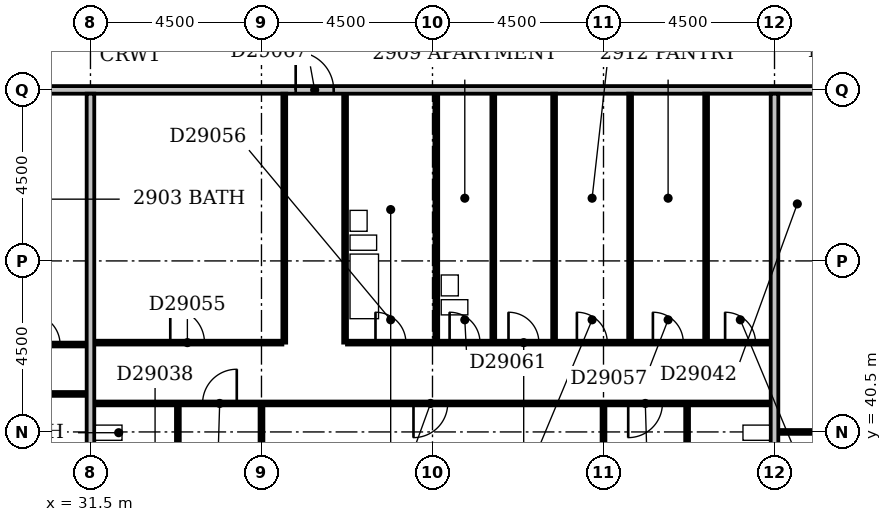
"""IFC4 building model, lengths in metres.
Left out: names, types, materials, properties, quantities, classifications, styles, units other than length and angle.
Written with IfcOpenShell. Run it as: python <this file> out.ifc"""

import sys

from ifc_helpers import new_model, si_unit, direction, frame, frame_2d, origin, place, context, subcontext, project, spatial, rectangle, extrude, element, fill, save


model = new_model("IFC4")
c1 = context("Model", 3, precision=1e-05, world=origin(), true_north=direction((0.0, 1.0)))
c2 = subcontext(c1, "Body", "Model", "MODEL_VIEW")
j1 = project(units=[si_unit("LENGTHUNIT", "METRE"), si_unit("PLANEANGLEUNIT", "RADIAN")], contexts=[c1])
p1 = place(None, origin())
s1 = spatial("IfcSite", under=j1, at=p1, CompositionType="ELEMENT")
p2 = place(p1, origin())
s2 = spatial("IfcBuilding", under=s1, at=p2, CompositionType="ELEMENT")
p3 = place(p2, frame((0.0, 0.0, 119.6)))
s3 = spatial("IfcBuildingStorey", under=s2, at=p3, CompositionType="ELEMENT", Elevation=119.6)
p4 = place(p3, frame((31.5, 36.5, 0.0), z_axis=(0.0, 0.0, 1.0), x_axis=(0.0, 1.0, 0.0)))
e1 = element("IfcWall", 1, at=p4, inside=s3, PredefinedType="PARTITIONING", context=c2, shape_type="SweptSolid", body=[
    extrude(rectangle(XDim=12.9, YDim=0.2, at=frame_2d((6.45, 0.0))), origin(), (0.0, 0.0, 1.0), 3.3),
])
p5 = place(p3, frame((36.0, 36.5, 0.0), z_axis=(0.0, 0.0, 1.0), x_axis=(0.0, 1.0, 0.0)))
e2 = element("IfcWall", 2, at=p5, inside=s3, PredefinedType="PARTITIONING", context=c2, shape_type="SweptSolid", body=[
    extrude(rectangle(XDim=4.7, YDim=0.1, at=frame_2d((2.35, 0.0))), origin(), (0.0, 0.0, 1.0), 2.4),
])
p6 = place(p3, frame((45.0, 36.5, 0.0), z_axis=(0.0, 0.0, 1.0), x_axis=(0.0, 1.0, 0.0)))
e3 = element("IfcWall", 3, at=p6, inside=s3, PredefinedType="PARTITIONING", context=c2, shape_type="SweptSolid", body=[
    extrude(rectangle(XDim=4.7, YDim=0.1, at=frame_2d((2.35, 0.0))), origin(), (0.0, 0.0, 1.0), 2.6),
])
p7 = place(p3, frame((49.5, 36.5, 0.0), z_axis=(0.0, 0.0, 1.0), x_axis=(0.0, 1.0, 0.0)))
e4 = element("IfcWall", 4, at=p7, inside=s3, PredefinedType="PARTITIONING", context=c2, shape_type="SweptSolid", body=[
    extrude(rectangle(XDim=12.9, YDim=0.2, at=frame_2d((6.45, 0.0))), origin(), (0.0, 0.0, 1.0), 3.3),
])
p8 = place(p3, frame((33.8, 38.35, 0.0), z_axis=(0.0, 0.0, 1.0), x_axis=(0.0, 1.0, 0.0)))
e5 = element("IfcWall", 5, at=p8, inside=s3, PredefinedType="PLUMBINGWALL", context=c2, shape_type="SweptSolid", body=[
    extrude(rectangle(XDim=2.85, YDim=0.1, at=frame_2d((1.425, 0.0))), origin(), (0.0, 0.0, 1.0), 3.3),
])
p9 = place(p8, frame((1.05, 0.0, 0.0)))
e6 = element("IfcOpeningElement", 6, at=p9, cuts=e5, PredefinedType="OPENING", context=c2, shape_type="SweptSolid", body=[
    extrude(rectangle(XDim=0.8, YDim=2.1, at=frame_2d((0.4, 1.05))), frame((0.0, 0.062, 0.0), z_axis=(0.0, -1.0, 0.0), x_axis=(1.0, 0.0, 0.0)), (0.0, 0.0, 1.0), 0.124),
])
p10 = place(p3, frame((47.2, 38.35, 0.0), z_axis=(0.0, 0.0, 1.0), x_axis=(0.0, 1.0, 0.0)))
e7 = element("IfcWall", 7, at=p10, inside=s3, PredefinedType="PLUMBINGWALL", context=c2, shape_type="SweptSolid", body=[
    extrude(rectangle(XDim=2.85, YDim=0.1, at=frame_2d((1.425, 0.0))), origin(), (0.0, 0.0, 1.0), 3.3),
])
p11 = place(p10, frame((1.05, 0.0, 0.0)))
e8 = element("IfcOpeningElement", 8, at=p11, cuts=e7, PredefinedType="OPENING", context=c2, shape_type="SweptSolid", body=[
    extrude(rectangle(XDim=0.8, YDim=2.1, at=frame_2d((0.4, 1.05))), frame((0.0, 0.062, 0.0), z_axis=(0.0, -1.0, 0.0), x_axis=(1.0, 0.0, 0.0)), (0.0, 0.0, 1.0), 0.124),
])
p12 = place(p3, frame((49.6, 40.5, 0.0), z_axis=(0.0, 0.0, 1.0), x_axis=(1.0, 0.0, 0.0)))
e9 = element("IfcWall", 9, at=p12, inside=s3, PredefinedType="PARTITIONING", context=c2, shape_type="SweptSolid", body=[
    extrude(rectangle(XDim=4.3, YDim=0.1, at=frame_2d((2.15, 0.0))), origin(), (0.0, 0.0, 1.0), 3.3),
])
p13 = place(p12, frame((1.7, 0.0, 0.0)))
e10 = element("IfcOpeningElement", 10, at=p13, cuts=e9, PredefinedType="OPENING", context=c2, shape_type="SweptSolid", body=[
    extrude(rectangle(XDim=0.9, YDim=2.1, at=frame_2d((0.45, 1.05))), frame((0.0, 0.062, 0.0), z_axis=(0.0, -1.0, 0.0), x_axis=(1.0, 0.0, 0.0)), (0.0, 0.0, 1.0), 0.124),
])
p14 = place(p3, frame((31.6, 41.25, 0.0), z_axis=(0.0, 0.0, 1.0), x_axis=(1.0, 0.0, 0.0)))
e11 = element("IfcWall", 11, at=p14, inside=s3, PredefinedType="PARTITIONING", context=c2, shape_type="SweptSolid", body=[
    extrude(rectangle(XDim=17.8, YDim=0.1, at=frame_2d((8.9, 0.0))), origin(), (0.0, 0.0, 1.0), 3.3),
])
p15 = place(p14, frame((2.85, 0.0, 0.0)))
e12 = element("IfcOpeningElement", 12, at=p15, cuts=e11, PredefinedType="OPENING", context=c2, shape_type="SweptSolid", body=[
    extrude(rectangle(XDim=0.9, YDim=2.1, at=frame_2d((0.45, 1.05))), frame((0.0, 0.062, 0.0), z_axis=(0.0, -1.0, 0.0), x_axis=(1.0, 0.0, 0.0)), (0.0, 0.0, 1.0), 0.124),
])
p16 = place(p14, frame((8.4, 0.0, 0.0)))
e13 = element("IfcOpeningElement", 13, at=p16, cuts=e11, PredefinedType="OPENING", context=c2, shape_type="SweptSolid", body=[
    extrude(rectangle(XDim=0.9, YDim=2.1, at=frame_2d((0.45, 1.05))), frame((0.0, 0.062, 0.0), z_axis=(0.0, -1.0, 0.0), x_axis=(1.0, 0.0, 0.0)), (0.0, 0.0, 1.0), 0.124),
])
p17 = place(p14, frame((14.05, 0.0, 0.0)))
e14 = element("IfcOpeningElement", 14, at=p17, cuts=e11, PredefinedType="OPENING", context=c2, shape_type="SweptSolid", body=[
    extrude(rectangle(XDim=0.9, YDim=2.1, at=frame_2d((0.45, 1.05))), frame((0.0, 0.062, 0.0), z_axis=(0.0, -1.0, 0.0), x_axis=(1.0, 0.0, 0.0)), (0.0, 0.0, 1.0), 0.124),
])
p18 = place(p3, frame((22.6, 41.5, 0.0), z_axis=(0.0, 0.0, 1.0), x_axis=(1.0, 0.0, 0.0)))
e15 = element("IfcWall", 15, at=p18, inside=s3, PredefinedType="PARTITIONING", context=c2, shape_type="SweptSolid", body=[
    extrude(rectangle(XDim=8.8, YDim=0.1, at=frame_2d((4.4, 0.0))), origin(), (0.0, 0.0, 1.0), 3.3),
])
p19 = place(p18, frame((1.7, 0.0, 0.0)))
e16 = element("IfcOpeningElement", 16, at=p19, cuts=e15, PredefinedType="OPENING", context=c2, shape_type="SweptSolid", body=[
    extrude(rectangle(XDim=0.9, YDim=2.1, at=frame_2d((0.45, 1.05))), frame((0.0, 0.062, 0.0), z_axis=(0.0, -1.0, 0.0), x_axis=(1.0, 0.0, 0.0)), (0.0, 0.0, 1.0), 0.124),
])
p20 = place(p18, frame((6.2, 0.0, 0.0)))
e17 = element("IfcOpeningElement", 17, at=p20, cuts=e15, PredefinedType="OPENING", context=c2, shape_type="SweptSolid", body=[
    extrude(rectangle(XDim=0.9, YDim=2.1, at=frame_2d((0.45, 1.05))), frame((0.0, 0.062, 0.0), z_axis=(0.0, -1.0, 0.0), x_axis=(1.0, 0.0, 0.0)), (0.0, 0.0, 1.0), 0.124),
])
p21 = place(p3, frame((24.15, 42.8, 0.0), z_axis=(0.0, 0.0, 1.0), x_axis=(1.0, 0.0, 0.0)))
e18 = element("IfcWall", 18, at=p21, inside=s3, PredefinedType="PARTITIONING", context=c2, shape_type="SweptSolid", body=[
    extrude(rectangle(XDim=7.25, YDim=0.1, at=frame_2d((3.625, 0.0))), origin(), (0.0, 0.0, 1.0), 3.3),
])
p22 = place(p21, frame((5.75, 0.0, 0.0)))
e19 = element("IfcOpeningElement", 19, at=p22, cuts=e18, PredefinedType="OPENING", context=c2, shape_type="SweptSolid", body=[
    extrude(rectangle(XDim=0.8, YDim=2.1, at=frame_2d((0.4, 1.05))), frame((0.0, 0.062, 0.0), z_axis=(0.0, -1.0, 0.0), x_axis=(1.0, 0.0, 0.0)), (0.0, 0.0, 1.0), 0.124),
])
p23 = place(p21, frame((2.0, 0.0, 0.0)))
e20 = element("IfcOpeningElement", 20, at=p23, cuts=e18, PredefinedType="OPENING", context=c2, shape_type="SweptSolid", body=[
    extrude(rectangle(XDim=0.9, YDim=2.1, at=frame_2d((0.45, 1.05))), frame((0.0, 0.062, 0.0), z_axis=(0.0, -1.0, 0.0), x_axis=(1.0, 0.0, 0.0)), (0.0, 0.0, 1.0), 0.124),
])
p24 = place(p3, frame((31.6, 42.85, 0.0), z_axis=(0.0, 0.0, 1.0), x_axis=(1.0, 0.0, 0.0)))
e21 = element("IfcWall", 21, at=p24, inside=s3, PredefinedType="PARTITIONING", context=c2, shape_type="SweptSolid", body=[
    extrude(rectangle(XDim=4.95, YDim=0.1, at=frame_2d((2.475, 0.0))), origin(), (0.0, 0.0, 1.0), 3.3),
])
p25 = place(p24, frame((2.0, 0.0, 0.0)))
e22 = element("IfcOpeningElement", 22, at=p25, cuts=e21, PredefinedType="OPENING", context=c2, shape_type="SweptSolid", body=[
    extrude(rectangle(XDim=0.9, YDim=2.1, at=frame_2d((0.45, 1.05))), frame((0.0, 0.062, 0.0), z_axis=(0.0, -1.0, 0.0), x_axis=(1.0, 0.0, 0.0)), (0.0, 0.0, 1.0), 0.124),
])
p26 = place(p3, frame((36.6, 42.85, 0.0), z_axis=(0.0, 0.0, 1.0), x_axis=(0.0, 1.0, 0.0)))
e23 = element("IfcWall", 23, at=p26, inside=s3, PredefinedType="PARTITIONING", context=c2, shape_type="SweptSolid", body=[
    extrude(rectangle(XDim=6.55, YDim=0.1, at=frame_2d((3.275, 0.0))), origin(), (0.0, 0.0, 1.0), 2.4),
])
p27 = place(p3, frame((38.2, 42.85, 0.0), z_axis=(0.0, 0.0, 1.0), x_axis=(0.0, 1.0, 0.0)))
e24 = element("IfcWall", 24, at=p27, inside=s3, PredefinedType="PLUMBINGWALL", context=c2, shape_type="SweptSolid", body=[
    extrude(rectangle(XDim=6.55, YDim=0.1, at=frame_2d((3.275, 0.0))), origin(), (0.0, 0.0, 1.0), 3.3),
])
p28 = place(p3, frame((38.25, 42.85, 0.0), z_axis=(0.0, 0.0, 1.0), x_axis=(1.0, 0.0, 0.0)))
e25 = element("IfcWall", 25, at=p28, inside=s3, PredefinedType="PARTITIONING", context=c2, shape_type="SweptSolid", body=[
    extrude(rectangle(XDim=11.15, YDim=0.1, at=frame_2d((5.575, 0.0))), origin(), (0.0, 0.0, 1.0), 3.3),
])
p29 = place(p28, frame((0.75, 0.0, 0.0)))
e26 = element("IfcOpeningElement", 26, at=p29, cuts=e25, PredefinedType="OPENING", context=c2, shape_type="SweptSolid", body=[
    extrude(rectangle(XDim=0.8, YDim=2.1, at=frame_2d((0.4, 1.05))), frame((0.0, 0.062, 0.0), z_axis=(0.0, -1.0, 0.0), x_axis=(1.0, 0.0, 0.0)), (0.0, 0.0, 1.0), 0.124),
])
p30 = place(p28, frame((8.05, 0.0, 0.0)))
e27 = element("IfcOpeningElement", 27, at=p30, cuts=e25, PredefinedType="OPENING", context=c2, shape_type="SweptSolid", body=[
    extrude(rectangle(XDim=0.8, YDim=2.1, at=frame_2d((0.4, 1.05))), frame((0.0, 0.062, 0.0), z_axis=(0.0, -1.0, 0.0), x_axis=(1.0, 0.0, 0.0)), (0.0, 0.0, 1.0), 0.124),
])
p31 = place(p28, frame((4.25, 0.0, 0.0)))
e28 = element("IfcOpeningElement", 28, at=p31, cuts=e25, PredefinedType="OPENING", context=c2, shape_type="SweptSolid", body=[
    extrude(rectangle(XDim=0.8, YDim=2.1, at=frame_2d((0.4, 1.05))), frame((0.0, 0.062, 0.0), z_axis=(0.0, -1.0, 0.0), x_axis=(1.0, 0.0, 0.0)), (0.0, 0.0, 1.0), 0.124),
])
p32 = place(p28, frame((6.05, 0.0, 0.0)))
e29 = element("IfcOpeningElement", 29, at=p32, cuts=e25, PredefinedType="OPENING", context=c2, shape_type="SweptSolid", body=[
    extrude(rectangle(XDim=0.8, YDim=2.1, at=frame_2d((0.4, 1.05))), frame((0.0, 0.062, 0.0), z_axis=(0.0, -1.0, 0.0), x_axis=(1.0, 0.0, 0.0)), (0.0, 0.0, 1.0), 0.124),
])
p33 = place(p28, frame((9.95, 0.0, 0.0)))
e30 = element("IfcOpeningElement", 30, at=p33, cuts=e25, PredefinedType="OPENING", context=c2, shape_type="SweptSolid", body=[
    extrude(rectangle(XDim=0.8, YDim=2.1, at=frame_2d((0.4, 1.05))), frame((0.0, 0.062, 0.0), z_axis=(0.0, -1.0, 0.0), x_axis=(1.0, 0.0, 0.0)), (0.0, 0.0, 1.0), 0.124),
])
p34 = place(p28, frame((2.7, 0.0, 0.0)))
e31 = element("IfcOpeningElement", 31, at=p34, cuts=e25, PredefinedType="OPENING", context=c2, shape_type="SweptSolid", body=[
    extrude(rectangle(XDim=0.8, YDim=2.1, at=frame_2d((0.4, 1.05))), frame((0.0, 0.062, 0.0), z_axis=(0.0, -1.0, 0.0), x_axis=(1.0, 0.0, 0.0)), (0.0, 0.0, 1.0), 0.124),
])
for number, where, z_axis, x_axis in (
    (32, (40.6, 42.9, 0.0), (0.0, 0.0, 1.0), (0.0, 1.0, 0.0)),
    (33, (42.1, 42.9, 0.0), (0.0, 0.0, 1.0), (0.0, 1.0, 0.0)),
):
    element("IfcWall", number, at=place(p3, frame(where, z_axis=z_axis, x_axis=x_axis)), inside=s3, PredefinedType="PLUMBINGWALL", context=c2, shape_type="SweptSolid", body=[
        extrude(rectangle(XDim=6.5, YDim=0.1, at=frame_2d((3.25, 0.0))), origin(), (0.0, 0.0, 1.0), 3.3),
    ])
p35 = place(p3, frame((43.7, 42.9, 0.0), z_axis=(0.0, 0.0, 1.0), x_axis=(0.0, 1.0, 0.0)))
e34 = element("IfcWall", 34, at=p35, inside=s3, PredefinedType="PARTITIONING", context=c2, shape_type="SweptSolid", body=[
    extrude(rectangle(XDim=6.5, YDim=0.1, at=frame_2d((3.25, 0.0))), origin(), (0.0, 0.0, 1.0), 3.3),
])
p36 = place(p3, frame((45.7, 42.9, 0.0), z_axis=(0.0, 0.0, 1.0), x_axis=(0.0, 1.0, 0.0)))
e35 = element("IfcWall", 35, at=p36, inside=s3, PredefinedType="PARTITIONING", context=c2, shape_type="SweptSolid", body=[
    extrude(rectangle(XDim=6.5, YDim=0.1, at=frame_2d((3.25, 0.0))), origin(), (0.0, 0.0, 1.0), 2.6),
])
p37 = place(p3, frame((47.7, 42.9, 0.0), z_axis=(0.0, 0.0, 1.0), x_axis=(0.0, 1.0, 0.0)))
e36 = element("IfcWall", 36, at=p37, inside=s3, PredefinedType="PARTITIONING", context=c2, shape_type="SweptSolid", body=[
    extrude(rectangle(XDim=6.5, YDim=0.1, at=frame_2d((3.25, 0.0))), origin(), (0.0, 0.0, 1.0), 3.3),
])
p38 = place(p3, frame((9.1, 49.5, 0.0), z_axis=(0.0, 0.0, 1.0), x_axis=(1.0, 0.0, 0.0)))
e37 = element("IfcWall", 37, at=p38, inside=s3, PredefinedType="PARTITIONING", context=c2, shape_type="SweptSolid", body=[
    extrude(rectangle(XDim=41.55, YDim=0.2, at=frame_2d((20.775, 0.0))), origin(), (0.0, 0.0, 1.0), 3.3),
])
p39 = place(p38, frame((13.7, 0.0, 0.0)))
e38 = element("IfcOpeningElement", 38, at=p39, cuts=e37, PredefinedType="OPENING", context=c2, shape_type="SweptSolid", body=[
    extrude(rectangle(XDim=1.0, YDim=2.1, at=frame_2d((0.5, 1.05))), frame((0.0, 0.112, 0.0), z_axis=(0.0, -1.0, 0.0), x_axis=(1.0, 0.0, 0.0)), (0.0, 0.0, 1.0), 0.224),
])
p40 = place(p38, frame((27.8, 0.0, 0.0)))
e39 = element("IfcOpeningElement", 39, at=p40, cuts=e37, PredefinedType="OPENING", context=c2, shape_type="SweptSolid", body=[
    extrude(rectangle(XDim=1.0, YDim=2.1, at=frame_2d((0.5, 1.05))), frame((0.0, 0.112, 0.0), z_axis=(0.0, -1.0, 0.0), x_axis=(1.0, 0.0, 0.0)), (0.0, 0.0, 1.0), 0.224),
])
p41 = place(p38, frame((8.4, 0.0, 0.0)))
e40 = element("IfcOpeningElement", 40, at=p41, cuts=e37, PredefinedType="OPENING", context=c2, shape_type="SweptSolid", body=[
    extrude(rectangle(XDim=0.9, YDim=2.1, at=frame_2d((0.45, 1.05))), frame((0.0, 0.112, 0.0), z_axis=(0.0, -1.0, 0.0), x_axis=(1.0, 0.0, 0.0)), (0.0, 0.0, 1.0), 0.224),
])
p42 = place(p15, frame((0.9, 0.0, 0.0), z_axis=(0.0, 0.0, 1.0), x_axis=(-1.0, 0.0, 0.0)))
e41 = element("IfcDoor", 41, at=p42, inside=s3, OperationType="SINGLE_SWING_LEFT", PredefinedType="DOOR", context=c2, shape_type="SweptSolid", body=[
    extrude(rectangle(XDim=0.9, YDim=2.1, at=frame_2d((0.45, 1.05))), frame((0.0, 0.025, 0.0), z_axis=(0.0, -1.0, 0.0), x_axis=(1.0, 0.0, 0.0)), (0.0, 0.0, 1.0), 0.05),
])
fill(e12, e41)
p43 = place(p16, frame((0.9, 0.0, 0.0), z_axis=(0.0, 0.0, 1.0), x_axis=(-1.0, 0.0, 0.0)))
e42 = element("IfcDoor", 42, at=p43, inside=s3, OperationType="SINGLE_SWING_RIGHT", PredefinedType="DOOR", context=c2, shape_type="SweptSolid", body=[
    extrude(rectangle(XDim=0.9, YDim=2.1, at=frame_2d((0.45, 1.05))), frame((0.0, 0.025, 0.0), z_axis=(0.0, -1.0, 0.0), x_axis=(1.0, 0.0, 0.0)), (0.0, 0.0, 1.0), 0.05),
])
fill(e13, e42)
p44 = place(p17, frame((0.9, 0.0, 0.0), z_axis=(0.0, 0.0, 1.0), x_axis=(-1.0, 0.0, 0.0)))
e43 = element("IfcDoor", 43, at=p44, inside=s3, OperationType="SINGLE_SWING_RIGHT", PredefinedType="DOOR", context=c2, shape_type="SweptSolid", body=[
    extrude(rectangle(XDim=0.9, YDim=2.1, at=frame_2d((0.45, 1.05))), frame((0.0, 0.025, 0.0), z_axis=(0.0, -1.0, 0.0), x_axis=(1.0, 0.0, 0.0)), (0.0, 0.0, 1.0), 0.05),
])
fill(e14, e43)
p45 = place(p22, origin())
e44 = element("IfcDoor", 44, at=p45, inside=s3, OperationType="SINGLE_SWING_LEFT", PredefinedType="DOOR", context=c2, shape_type="SweptSolid", body=[
    extrude(rectangle(XDim=0.8, YDim=2.1, at=frame_2d((0.4, 1.05))), frame((0.0, 0.025, 0.0), z_axis=(0.0, -1.0, 0.0), x_axis=(1.0, 0.0, 0.0)), (0.0, 0.0, 1.0), 0.05),
])
fill(e19, e44)
p46 = place(p25, origin())
e45 = element("IfcDoor", 45, at=p46, inside=s3, OperationType="SINGLE_SWING_LEFT", PredefinedType="DOOR", context=c2, shape_type="SweptSolid", body=[
    extrude(rectangle(XDim=0.9, YDim=2.1, at=frame_2d((0.45, 1.05))), frame((0.0, 0.025, 0.0), z_axis=(0.0, -1.0, 0.0), x_axis=(1.0, 0.0, 0.0)), (0.0, 0.0, 1.0), 0.05),
])
fill(e22, e45)
p47 = place(p29, origin())
e46 = element("IfcDoor", 46, at=p47, inside=s3, OperationType="SINGLE_SWING_LEFT", PredefinedType="DOOR", context=c2, shape_type="SweptSolid", body=[
    extrude(rectangle(XDim=0.8, YDim=2.1, at=frame_2d((0.4, 1.05))), frame((0.0, 0.025, 0.0), z_axis=(0.0, -1.0, 0.0), x_axis=(1.0, 0.0, 0.0)), (0.0, 0.0, 1.0), 0.05),
])
fill(e26, e46)
p48 = place(p30, origin())
e47 = element("IfcDoor", 47, at=p48, inside=s3, OperationType="SINGLE_SWING_LEFT", PredefinedType="DOOR", context=c2, shape_type="SweptSolid", body=[
    extrude(rectangle(XDim=0.8, YDim=2.1, at=frame_2d((0.4, 1.05))), frame((0.0, 0.025, 0.0), z_axis=(0.0, -1.0, 0.0), x_axis=(1.0, 0.0, 0.0)), (0.0, 0.0, 1.0), 0.05),
])
fill(e27, e47)
p49 = place(p31, origin())
e48 = element("IfcDoor", 48, at=p49, inside=s3, OperationType="SINGLE_SWING_LEFT", PredefinedType="DOOR", context=c2, shape_type="SweptSolid", body=[
    extrude(rectangle(XDim=0.8, YDim=2.1, at=frame_2d((0.4, 1.05))), frame((0.0, 0.025, 0.0), z_axis=(0.0, -1.0, 0.0), x_axis=(1.0, 0.0, 0.0)), (0.0, 0.0, 1.0), 0.05),
])
fill(e28, e48)
p50 = place(p32, origin())
e49 = element("IfcDoor", 49, at=p50, inside=s3, OperationType="SINGLE_SWING_LEFT", PredefinedType="DOOR", context=c2, shape_type="SweptSolid", body=[
    extrude(rectangle(XDim=0.8, YDim=2.1, at=frame_2d((0.4, 1.05))), frame((0.0, 0.025, 0.0), z_axis=(0.0, -1.0, 0.0), x_axis=(1.0, 0.0, 0.0)), (0.0, 0.0, 1.0), 0.05),
])
fill(e29, e49)
p51 = place(p33, origin())
e50 = element("IfcDoor", 50, at=p51, inside=s3, OperationType="SINGLE_SWING_LEFT", PredefinedType="DOOR", context=c2, shape_type="SweptSolid", body=[
    extrude(rectangle(XDim=0.8, YDim=2.1, at=frame_2d((0.4, 1.05))), frame((0.0, 0.025, 0.0), z_axis=(0.0, -1.0, 0.0), x_axis=(1.0, 0.0, 0.0)), (0.0, 0.0, 1.0), 0.05),
])
fill(e30, e50)
p52 = place(p34, origin())
e51 = element("IfcDoor", 51, at=p52, inside=s3, OperationType="SINGLE_SWING_LEFT", PredefinedType="DOOR", context=c2, shape_type="SweptSolid", body=[
    extrude(rectangle(XDim=0.8, YDim=2.1, at=frame_2d((0.4, 1.05))), frame((0.0, 0.025, 0.0), z_axis=(0.0, -1.0, 0.0), x_axis=(1.0, 0.0, 0.0)), (0.0, 0.0, 1.0), 0.05),
])
fill(e31, e51)
p53 = place(p40, origin())
e52 = element("IfcDoor", 52, at=p53, inside=s3, OperationType="SINGLE_SWING_LEFT", PredefinedType="DOOR", context=c2, shape_type="SweptSolid", body=[
    extrude(rectangle(XDim=1.0, YDim=2.1, at=frame_2d((0.5, 1.05))), frame((0.0, 0.025, 0.0), z_axis=(0.0, -1.0, 0.0), x_axis=(1.0, 0.0, 0.0)), (0.0, 0.0, 1.0), 0.05),
])
fill(e39, e52)
save(model, sys.argv[1])
